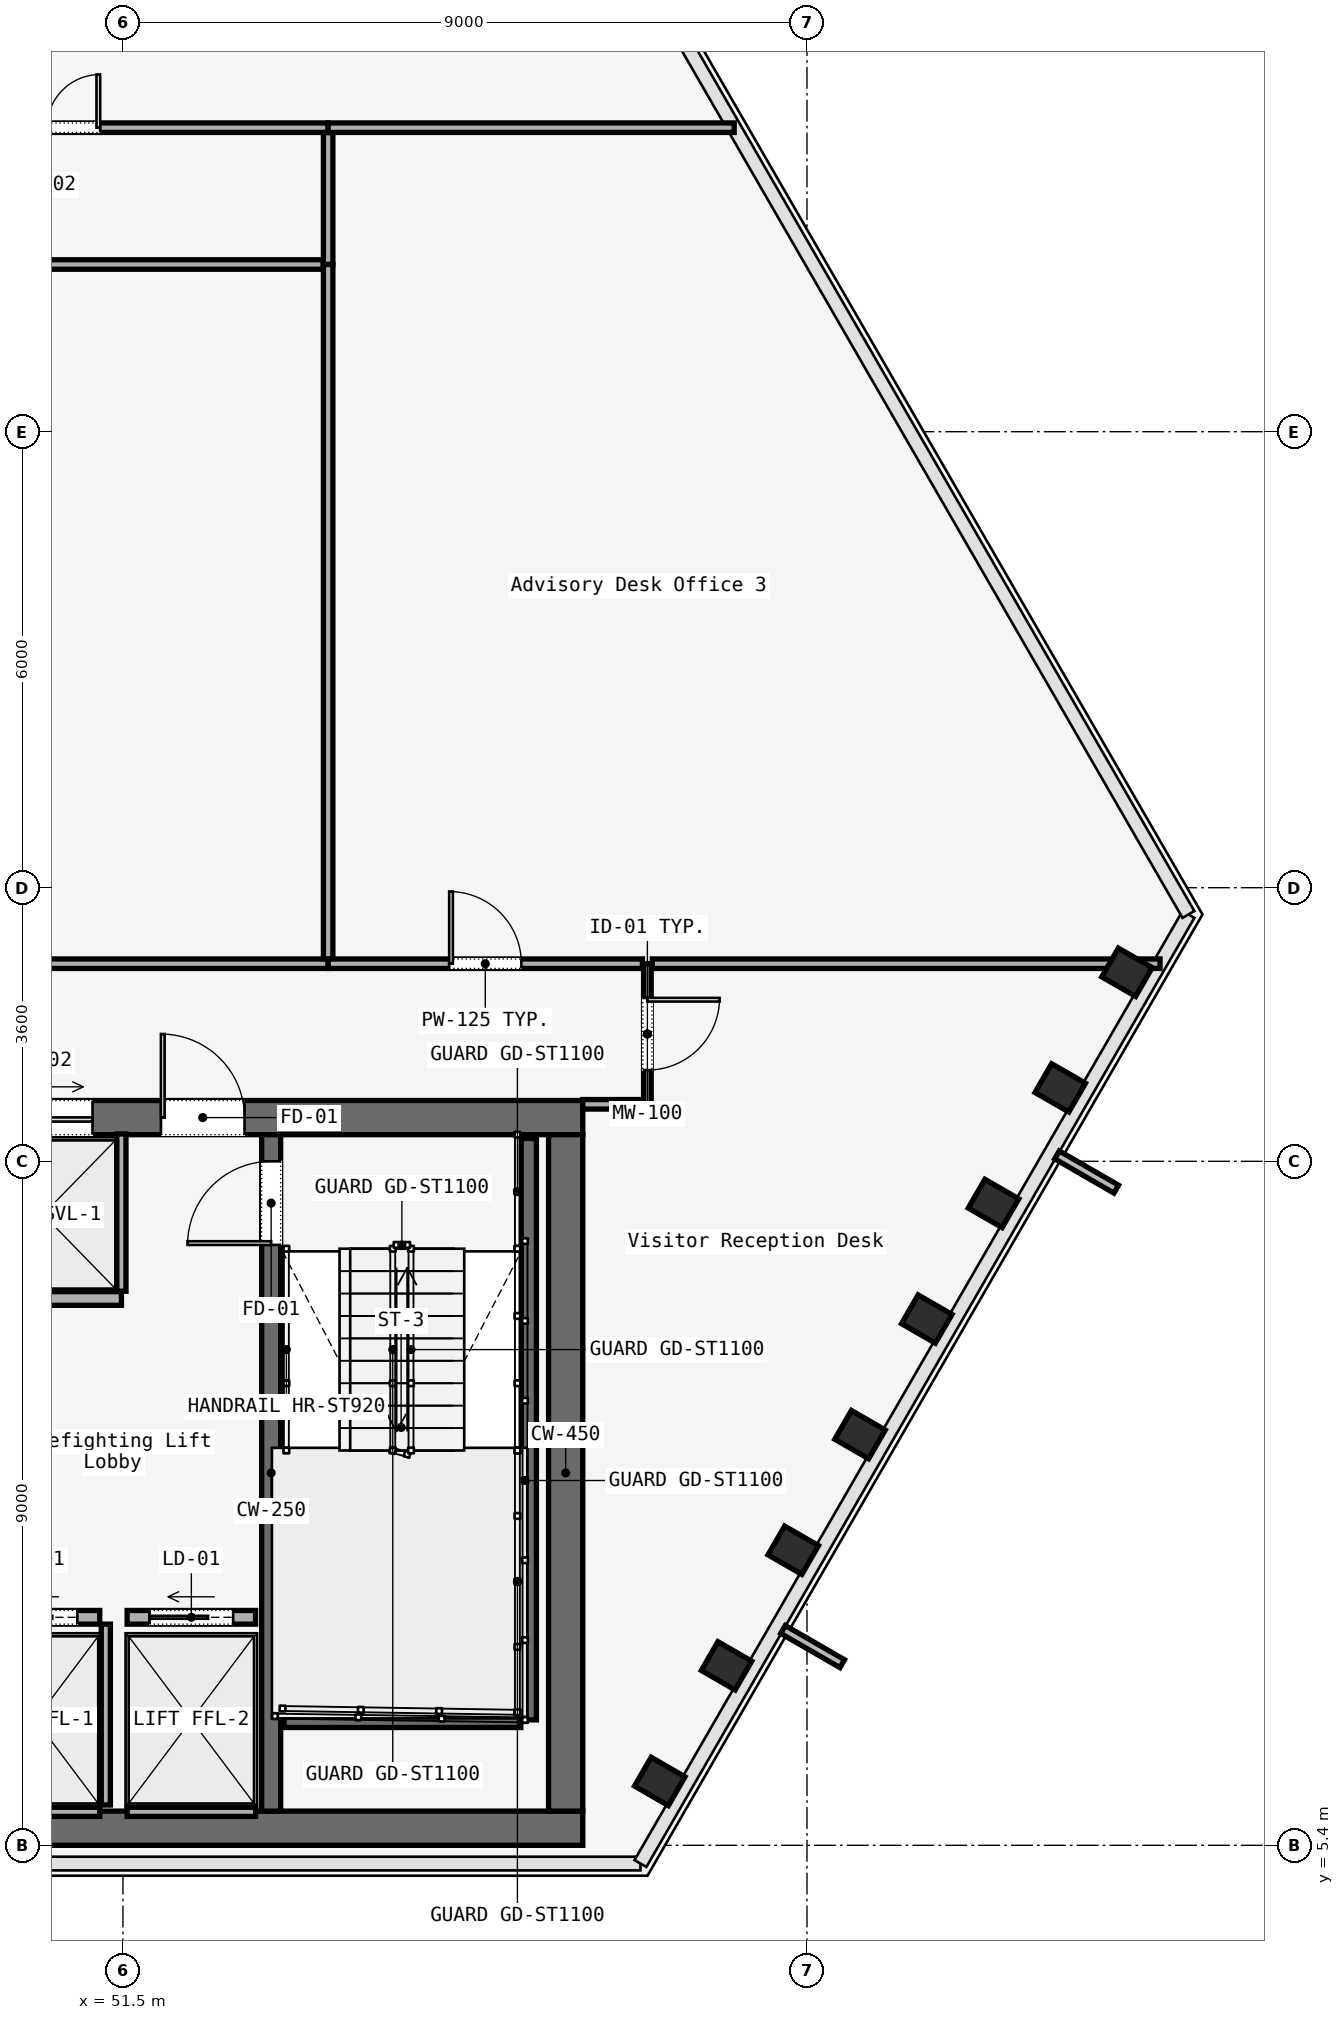
"""IFC4 building model, lengths in metres.
Left out: names, types, materials, properties, quantities, classifications, styles, units other than length and angle.
Written with IfcOpenShell. Run it as: python <this file> out.ifc"""

import sys

from ifc_helpers import new_model, si_unit, direction, frame, frame_2d, origin, origin_2d, place, context, subcontext, project, spatial, rectangle, i_section, extrude, element, fill, save


model = new_model("IFC4")
c1 = context("Model", 3, precision=1e-05, world=origin(), true_north=direction((0.0, 1.0)))
c2 = subcontext(c1, "Body", "Model", "MODEL_VIEW")
j1 = project(units=[si_unit("LENGTHUNIT", "METRE"), si_unit("PLANEANGLEUNIT", "RADIAN")], contexts=[c1])
p1 = place(None, origin())
s1 = spatial("IfcSite", under=j1, at=p1, CompositionType="ELEMENT")
p2 = place(p1, origin())
s2 = spatial("IfcBuilding", under=s1, at=p2, CompositionType="ELEMENT")
p3 = place(p2, frame((0.0, 0.0, 81.6)))
s3 = spatial("IfcBuildingStorey", under=s2, at=p3, CompositionType="ELEMENT", Elevation=81.6)
p4 = place(p3, frame((26.45, 14.975, 0.0), z_axis=(0.0, 0.0, 1.0), x_axis=(1.0, 0.0, 0.0)))
e1 = element("IfcWall", 1, at=p4, inside=s3, PredefinedType="SOLIDWALL", context=c2, shape_type="SweptSolid", body=[
    extrude(rectangle(XDim=31.1, YDim=0.45, at=frame_2d((15.55, 0.0))), origin(), (0.0, 0.0, 1.0), 3.58),
])
p5 = place(p4, frame((1.65, 0.0, 0.0)))
e2 = element("IfcOpeningElement", 2, at=p5, cuts=e1, PredefinedType="OPENING", context=c2, shape_type="SweptSolid", body=[
    extrude(rectangle(XDim=1.1, YDim=2.2, at=frame_2d((0.55, 1.1))), frame((0.0, 0.225, 0.0), z_axis=(0.0, -1.0, 0.0), x_axis=(1.0, 0.0, 0.0)), (0.0, 0.0, 1.0), 0.45),
])
p6 = place(p4, frame((13.65, 0.0, 0.0)))
e3 = element("IfcOpeningElement", 3, at=p6, cuts=e1, PredefinedType="OPENING", context=c2, shape_type="SweptSolid", body=[
    extrude(rectangle(XDim=1.1, YDim=2.2, at=frame_2d((0.55, 1.1))), frame((0.0, 0.225, 0.0), z_axis=(0.0, -1.0, 0.0), x_axis=(1.0, 0.0, 0.0)), (0.0, 0.0, 1.0), 0.45),
])
p7 = place(p4, frame((25.55, 0.0, 0.0)))
e4 = element("IfcOpeningElement", 4, at=p7, cuts=e1, PredefinedType="OPENING", context=c2, shape_type="SweptSolid", body=[
    extrude(rectangle(XDim=1.1, YDim=2.2, at=frame_2d((0.55, 1.1))), frame((0.0, 0.225, 0.0), z_axis=(0.0, -1.0, 0.0), x_axis=(1.0, 0.0, 0.0)), (0.0, 0.0, 1.0), 0.45),
])
p8 = place(p4, frame((10.7, 0.0, 0.0)))
e5 = element("IfcOpeningElement", 5, at=p8, cuts=e1, PredefinedType="OPENING", context=c2, shape_type="SweptSolid", body=[
    extrude(rectangle(XDim=1.4, YDim=2.2, at=frame_2d((0.7, 1.1))), frame((0.0, 0.225, 0.0), z_axis=(0.0, -1.0, 0.0), x_axis=(1.0, 0.0, 0.0)), (0.0, 0.0, 1.0), 0.45),
])
p9 = place(p4, frame((19.35, 0.0, 0.0)))
e6 = element("IfcOpeningElement", 6, at=p9, cuts=e1, PredefinedType="OPENING", context=c2, shape_type="SweptSolid", body=[
    extrude(rectangle(XDim=1.1, YDim=2.2, at=frame_2d((0.55, 1.1))), frame((0.0, 0.225, 0.0), z_axis=(0.0, -1.0, 0.0), x_axis=(1.0, 0.0, 0.0)), (0.0, 0.0, 1.0), 0.45),
])
p10 = place(p4, frame((21.4, 0.0, 0.0)))
e7 = element("IfcOpeningElement", 7, at=p10, cuts=e1, PredefinedType="OPENING", context=c2, shape_type="SweptSolid", body=[
    extrude(rectangle(XDim=0.9, YDim=2.1, at=frame_2d((0.45, 1.05))), frame((0.0, 0.225, 0.0), z_axis=(0.0, -1.0, 0.0), x_axis=(1.0, 0.0, 0.0)), (0.0, 0.0, 1.0), 0.45),
])
p11 = place(p4, frame((23.35, 0.0, 0.0)))
e8 = element("IfcOpeningElement", 8, at=p11, cuts=e1, PredefinedType="OPENING", context=c2, shape_type="SweptSolid", body=[
    extrude(rectangle(XDim=1.3, YDim=2.3, at=frame_2d((0.65, 1.15))), frame((0.0, 0.225, 0.0), z_axis=(0.0, -1.0, 0.0), x_axis=(1.0, 0.0, 0.0)), (0.0, 0.0, 1.0), 0.45),
])
p12 = place(p3, frame((26.45, 5.625, 0.0), z_axis=(0.0, 0.0, 1.0), x_axis=(1.0, 0.0, 0.0)))
e9 = element("IfcWall", 9, at=p12, inside=s3, PredefinedType="SOLIDWALL", context=c2, shape_type="SweptSolid", body=[
    extrude(rectangle(XDim=31.1, YDim=0.45, at=frame_2d((15.55, 0.0))), origin(), (0.0, 0.0, 1.0), 3.58),
])
p13 = place(p3, frame((57.325, 5.85, 0.0), z_axis=(0.0, 0.0, 1.0), x_axis=(0.0, 1.0, 0.0)))
e10 = element("IfcWall", 10, at=p13, inside=s3, PredefinedType="SOLIDWALL", context=c2, shape_type="SweptSolid", body=[
    extrude(rectangle(XDim=8.9, YDim=0.45, at=frame_2d((4.45, 0.0))), origin(), (0.0, 0.0, 1.0), 3.58),
])
p14 = place(p3, frame((53.45, 5.85, 0.0), z_axis=(0.0, 0.0, 1.0), x_axis=(0.0, 1.0, 0.0)))
e11 = element("IfcWall", 11, at=p14, inside=s3, PredefinedType="SOLIDWALL", context=c2, shape_type="SweptSolid", body=[
    extrude(rectangle(XDim=8.9, YDim=0.25, at=frame_2d((4.45, 0.0))), origin(), (0.0, 0.0, 1.0), 3.58),
])
p15 = place(p14, frame((7.45, 0.0, 0.0)))
e12 = element("IfcOpeningElement", 12, at=p15, cuts=e11, PredefinedType="OPENING", context=c2, shape_type="SweptSolid", body=[
    extrude(rectangle(XDim=1.1, YDim=2.2, at=frame_2d((0.55, 1.1))), frame((0.0, 0.125, 0.0), z_axis=(0.0, -1.0, 0.0), x_axis=(1.0, 0.0, 0.0)), (0.0, 0.0, 1.0), 0.25),
])
for number, where, z_axis, x_axis in (
    (13, (58.563, 6.24, 0.0), (0.0, 0.0, 1.0), (0.5, 0.866, 0.0)),
    (14, (59.441, 7.761, 0.0), (0.0, 0.0, 1.0), (0.5, 0.866, 0.0)),
    (15, (60.32, 9.282, 0.0), (0.0, 0.0, 1.0), (0.5, 0.866, 0.0)),
    (16, (61.198, 10.803, 0.0), (0.0, 0.0, 1.0), (0.5, 0.866, 0.0)),
    (17, (62.076, 12.324, 0.0), (0.0, 0.0, 1.0), (0.5, 0.866, 0.0)),
    (18, (62.954, 13.845, 0.0), (0.0, 0.0, 1.0), (0.5, 0.866, 0.0)),
    (19, (63.832, 15.366, 0.0), (0.0, 0.0, 1.0), (0.5, 0.866, 0.0)),
    (20, (64.71, 16.887, 0.0), (0.0, 0.0, 1.0), (0.5, 0.866, 0.0)),
):
    element("IfcColumn", number, at=place(p3, frame(where, z_axis=z_axis, x_axis=x_axis)), inside=s3, PredefinedType="COLUMN", context=c2, shape_type="SweptSolid", body=[
        extrude(i_section(OverallWidth=0.437, OverallDepth=0.514, WebThickness=0.061, FlangeThickness=0.077, FilletRadius=0.015, at=origin_2d()), origin(), (0.0, 0.0, 1.0), 3.58),
    ])
p16 = place(p3, frame((56.84, 14.7, 0.0), z_axis=(0.0, 0.0, 1.0), x_axis=(0.0, -1.0, 0.0)))
e21 = element("IfcWall", 21, at=p16, inside=s3, PredefinedType="SOLIDWALL", context=c2, shape_type="SweptSolid", body=[
    extrude(rectangle(XDim=7.65, YDim=0.2, at=frame_2d((3.825, 0.0))), origin(), (0.0, 0.0, 1.0), 3.8),
])
p17 = place(p3, frame((53.62, 7.05, 0.0), z_axis=(0.0, 0.0, 1.0), x_axis=(1.0, 0.0, 0.0)))
e22 = element("IfcWall", 22, at=p17, inside=s3, PredefinedType="SOLIDWALL", context=c2, shape_type="SweptSolid", body=[
    extrude(rectangle(XDim=3.115, YDim=0.2, at=frame_2d((1.558, 0.0))), origin(), (0.0, 0.0, 1.0), 3.8),
])
p18 = place(p3, frame((49.505, 8.4, 0.0), z_axis=(0.0, 0.0, 1.0), x_axis=(1.0, 0.0, 0.0)))
e23 = element("IfcWall", 23, at=p18, inside=s3, PredefinedType="SOLIDWALL", context=c2, shape_type="SweptSolid", body=[
    extrude(rectangle(XDim=1.69, YDim=0.18, at=frame_2d((0.845, 0.0))), origin(), (0.0, 0.0, 1.0), 2.95),
])
p19 = place(p18, frame((0.295, 0.0, 0.0)))
e24 = element("IfcOpeningElement", 24, at=p19, cuts=e23, PredefinedType="OPENING", context=c2, shape_type="SweptSolid", body=[
    extrude(rectangle(XDim=1.1, YDim=2.2, at=frame_2d((0.55, 1.1))), frame((0.0, 0.09, 0.0), z_axis=(0.0, -1.0, 0.0), x_axis=(1.0, 0.0, 0.0)), (0.0, 0.0, 1.0), 0.18),
])
p20 = place(p3, frame((49.505, 5.84, 0.0), z_axis=(0.0, 0.0, 1.0), x_axis=(1.0, 0.0, 0.0)))
e25 = element("IfcWall", 25, at=p20, inside=s3, PredefinedType="SOLIDWALL", context=c2, shape_type="SweptSolid", body=[
    extrude(rectangle(XDim=1.69, YDim=0.12, at=frame_2d((0.845, 0.0))), origin(), (0.0, 0.0, 1.0), 2.95),
])
p21 = place(p3, frame((51.275, 5.93, 0.0), z_axis=(0.0, 0.0, 1.0), x_axis=(0.0, 1.0, 0.0)))
e26 = element("IfcWall", 26, at=p21, inside=s3, PredefinedType="SOLIDWALL", context=c2, shape_type="SweptSolid", body=[
    extrude(rectangle(XDim=2.38, YDim=0.12, at=frame_2d((1.19, 0.0))), origin(), (0.0, 0.0, 1.0), 2.95),
])
p22 = place(p3, frame((51.555, 8.4, 0.0), z_axis=(0.0, 0.0, 1.0), x_axis=(1.0, 0.0, 0.0)))
e27 = element("IfcWall", 27, at=p22, inside=s3, PredefinedType="SOLIDWALL", context=c2, shape_type="SweptSolid", body=[
    extrude(rectangle(XDim=1.69, YDim=0.18, at=frame_2d((0.845, 0.0))), origin(), (0.0, 0.0, 1.0), 2.95),
])
p23 = place(p22, frame((0.295, 0.0, 0.0)))
e28 = element("IfcOpeningElement", 28, at=p23, cuts=e27, PredefinedType="OPENING", context=c2, shape_type="SweptSolid", body=[
    extrude(rectangle(XDim=1.1, YDim=2.2, at=frame_2d((0.55, 1.1))), frame((0.0, 0.09, 0.0), z_axis=(0.0, -1.0, 0.0), x_axis=(1.0, 0.0, 0.0)), (0.0, 0.0, 1.0), 0.18),
])
p24 = place(p3, frame((51.555, 5.84, 0.0), z_axis=(0.0, 0.0, 1.0), x_axis=(1.0, 0.0, 0.0)))
e29 = element("IfcWall", 29, at=p24, inside=s3, PredefinedType="SOLIDWALL", context=c2, shape_type="SweptSolid", body=[
    extrude(rectangle(XDim=1.69, YDim=0.12, at=frame_2d((0.845, 0.0))), origin(), (0.0, 0.0, 1.0), 2.95),
])
p25 = place(p3, frame((49.44, 12.595, 0.0), z_axis=(0.0, 0.0, 1.0), x_axis=(1.0, 0.0, 0.0)))
e30 = element("IfcWall", 30, at=p25, inside=s3, PredefinedType="SOLIDWALL", context=c2, shape_type="SweptSolid", body=[
    extrude(rectangle(XDim=2.04, YDim=0.18, at=frame_2d((1.02, 0.0))), origin(), (0.0, 0.0, 1.0), 2.95),
])
p26 = place(p3, frame((51.48, 12.69, 0.0), z_axis=(0.0, 0.0, 1.0), x_axis=(0.0, 1.0, 0.0)))
e31 = element("IfcWall", 31, at=p26, inside=s3, PredefinedType="SOLIDWALL", context=c2, shape_type="SweptSolid", body=[
    extrude(rectangle(XDim=2.07, YDim=0.12, at=frame_2d((1.035, 0.0))), origin(), (0.0, 0.0, 1.0), 2.95),
])
p27 = place(p3, frame((58.4, 17.0, 0.0), z_axis=(0.0, 0.0, 1.0), x_axis=(0.0, -1.0, 0.0)))
e32 = element("IfcWall", 32, at=p27, inside=s3, PredefinedType="MOVABLE", context=c2, shape_type="SweptSolid", body=[
    extrude(rectangle(XDim=1.85, YDim=0.1, at=frame_2d((0.925, 0.0))), origin(), (0.0, 0.0, 1.0), 2.95),
])
p28 = place(p27, frame((0.45, 0.0, 0.0)))
e33 = element("IfcOpeningElement", 33, at=p28, cuts=e32, PredefinedType="OPENING", context=c2, shape_type="SweptSolid", body=[
    extrude(rectangle(XDim=0.95, YDim=2.2, at=frame_2d((0.475, 1.1))), frame((0.0, 0.05, 0.0), z_axis=(0.0, -1.0, 0.0), x_axis=(1.0, 0.0, 0.0)), (0.0, 0.0, 1.0), 0.1),
])
p29 = place(p3, frame((58.335, 15.15, 0.0), z_axis=(0.0, 0.0, 1.0), x_axis=(-1.0, 0.0, 0.0)))
e34 = element("IfcWall", 34, at=p29, inside=s3, PredefinedType="PARTITIONING", context=c2, shape_type="SweptSolid", body=[
    extrude(rectangle(XDim=0.785, YDim=0.125, at=frame_2d((0.393, 0.0))), origin(), (0.0, 0.0, 1.0), 2.95),
])
p30 = place(p3, frame((46.8, 28.0, 0.0), z_axis=(0.0, 0.0, 1.0), x_axis=(1.0, 0.0, 0.0)))
e35 = element("IfcWall", 35, at=p30, inside=s3, PredefinedType="PARTITIONING", context=c2, shape_type="SweptSolid", body=[
    extrude(rectangle(XDim=7.4, YDim=0.125, at=frame_2d((3.7, 0.0))), origin(), (0.0, 0.0, 1.0), 2.95),
])
p31 = place(p30, frame((3.0, 0.0, 0.0)))
e36 = element("IfcOpeningElement", 36, at=p31, cuts=e35, PredefinedType="OPENING", context=c2, shape_type="SweptSolid", body=[
    extrude(rectangle(XDim=1.4, YDim=2.2, at=frame_2d((0.7, 1.1))), frame((0.0, 0.062, 0.0), z_axis=(0.0, -1.0, 0.0), x_axis=(1.0, 0.0, 0.0)), (0.0, 0.0, 1.0), 0.125),
])
p32 = place(p3, frame((54.2, 27.935, 0.0), z_axis=(0.0, 0.0, 1.0), x_axis=(0.0, -1.0, 0.0)))
e37 = element("IfcWall", 37, at=p32, inside=s3, PredefinedType="PARTITIONING", context=c2, shape_type="SweptSolid", body=[
    extrude(rectangle(XDim=1.735, YDim=0.125, at=frame_2d((0.868, 0.0))), origin(), (0.0, 0.0, 1.0), 2.95),
])
p33 = place(p3, frame((54.135, 26.2, 0.0), z_axis=(0.0, 0.0, 1.0), x_axis=(-1.0, 0.0, 0.0)))
e38 = element("IfcWall", 38, at=p33, inside=s3, PredefinedType="PARTITIONING", context=c2, shape_type="SweptSolid", body=[
    extrude(rectangle(XDim=10.684, YDim=0.125, at=frame_2d((5.342, 0.0))), origin(), (0.0, 0.0, 1.0), 2.95),
])
p34 = place(p3, frame((43.451, 17.0, 0.0), z_axis=(0.0, 0.0, 1.0), x_axis=(1.0, 0.0, 0.0)))
e39 = element("IfcWall", 39, at=p34, inside=s3, PredefinedType="PARTITIONING", context=c2, shape_type="SweptSolid", body=[
    extrude(rectangle(XDim=10.749, YDim=0.125, at=frame_2d((5.374, 0.0))), origin(), (0.0, 0.0, 1.0), 2.95),
])
p35 = place(p34, frame((4.899, 0.0, 0.0)))
e40 = element("IfcOpeningElement", 40, at=p35, cuts=e39, PredefinedType="OPENING", context=c2, shape_type="SweptSolid", body=[
    extrude(rectangle(XDim=0.95, YDim=2.2, at=frame_2d((0.475, 1.1))), frame((0.0, 0.062, 0.0), z_axis=(0.0, -1.0, 0.0), x_axis=(1.0, 0.0, 0.0)), (0.0, 0.0, 1.0), 0.125),
])
p36 = place(p3, frame((54.2, 17.0, 0.0), z_axis=(0.0, 0.0, 1.0), x_axis=(1.0, 0.0, 0.0)))
e41 = element("IfcWall", 41, at=p36, inside=s3, PredefinedType="PARTITIONING", context=c2, shape_type="SweptSolid", body=[
    extrude(rectangle(XDim=4.135, YDim=0.125, at=frame_2d((2.067, 0.0))), origin(), (0.0, 0.0, 1.0), 2.95),
])
p37 = place(p36, frame((1.593, 0.0, 0.0)))
e42 = element("IfcOpeningElement", 42, at=p37, cuts=e41, PredefinedType="OPENING", context=c2, shape_type="SweptSolid", body=[
    extrude(rectangle(XDim=0.95, YDim=2.2, at=frame_2d((0.475, 1.1))), frame((0.0, 0.062, 0.0), z_axis=(0.0, -1.0, 0.0), x_axis=(1.0, 0.0, 0.0)), (0.0, 0.0, 1.0), 0.125),
])
p38 = place(p3, frame((58.465, 17.0, 0.0), z_axis=(0.0, 0.0, 1.0), x_axis=(1.0, 0.0, 0.0)))
e43 = element("IfcWall", 43, at=p38, inside=s3, PredefinedType="PARTITIONING", context=c2, shape_type="SweptSolid", body=[
    extrude(rectangle(XDim=6.68, YDim=0.125, at=frame_2d((3.34, 0.0))), origin(), (0.0, 0.0, 1.0), 2.95),
])
p39 = place(p3, frame((54.2, 26.2, 0.0), z_axis=(0.0, 0.0, 1.0), x_axis=(0.0, -1.0, 0.0)))
e44 = element("IfcWall", 44, at=p39, inside=s3, PredefinedType="PARTITIONING", context=c2, shape_type="SweptSolid", body=[
    extrude(rectangle(XDim=9.135, YDim=0.125, at=frame_2d((4.567, 0.0))), origin(), (0.0, 0.0, 1.0), 2.95),
])
p40 = place(p3, frame((54.2, 28.0, 0.0), z_axis=(0.0, 0.0, 1.0), x_axis=(1.0, 0.0, 0.0)))
e45 = element("IfcWall", 45, at=p40, inside=s3, PredefinedType="PARTITIONING", context=c2, shape_type="SweptSolid", body=[
    extrude(rectangle(XDim=5.342, YDim=0.125, at=frame_2d((2.671, 0.0))), origin(), (0.0, 0.0, 1.0), 2.95),
])
p41 = place(p7, origin())
e46 = element("IfcDoor", 46, at=p41, inside=s3, OperationType="SINGLE_SWING_RIGHT", PredefinedType="DOOR", context=c2, shape_type="SweptSolid", body=[
    extrude(rectangle(XDim=1.1, YDim=2.2, at=frame_2d((0.55, 1.1))), frame((0.0, 0.025, 0.0), z_axis=(0.0, -1.0, 0.0), x_axis=(1.0, 0.0, 0.0)), (0.0, 0.0, 1.0), 0.05),
])
fill(e4, e46)
p42 = place(p15, origin())
e47 = element("IfcDoor", 47, at=p42, inside=s3, OperationType="SINGLE_SWING_LEFT", PredefinedType="DOOR", context=c2, shape_type="SweptSolid", body=[
    extrude(rectangle(XDim=1.1, YDim=2.2, at=frame_2d((0.55, 1.1))), frame((0.0, 0.025, 0.0), z_axis=(0.0, -1.0, 0.0), x_axis=(1.0, 0.0, 0.0)), (0.0, 0.0, 1.0), 0.05),
])
fill(e12, e47)
p43 = place(p19, origin())
e48 = element("IfcDoor", 48, at=p43, inside=s3, OperationType="SLIDING_TO_LEFT", PredefinedType="DOOR", context=c2, shape_type="SweptSolid", body=[
    extrude(rectangle(XDim=1.1, YDim=2.2, at=frame_2d((0.55, 1.1))), frame((0.0, 0.025, 0.0), z_axis=(0.0, -1.0, 0.0), x_axis=(1.0, 0.0, 0.0)), (0.0, 0.0, 1.0), 0.05),
])
fill(e24, e48)
p44 = place(p23, origin())
e49 = element("IfcDoor", 49, at=p44, inside=s3, OperationType="SLIDING_TO_LEFT", PredefinedType="DOOR", context=c2, shape_type="SweptSolid", body=[
    extrude(rectangle(XDim=1.1, YDim=2.2, at=frame_2d((0.55, 1.1))), frame((0.0, 0.025, 0.0), z_axis=(0.0, -1.0, 0.0), x_axis=(1.0, 0.0, 0.0)), (0.0, 0.0, 1.0), 0.05),
])
fill(e28, e49)
p45 = place(p11, origin())
e50 = element("IfcDoor", 50, at=p45, inside=s3, OperationType="DOUBLE_DOOR_SLIDING", PredefinedType="DOOR", context=c2, shape_type="SweptSolid", body=[
    extrude(rectangle(XDim=1.3, YDim=2.3, at=frame_2d((0.65, 1.15))), frame((0.0, 0.025, 0.0), z_axis=(0.0, -1.0, 0.0), x_axis=(1.0, 0.0, 0.0)), (0.0, 0.0, 1.0), 0.05),
])
fill(e8, e50)
p46 = place(p28, origin())
e51 = element("IfcDoor", 51, at=p46, inside=s3, OperationType="SINGLE_SWING_RIGHT", PredefinedType="DOOR", context=c2, shape_type="SweptSolid", body=[
    extrude(rectangle(XDim=0.95, YDim=2.2, at=frame_2d((0.475, 1.1))), frame((0.0, 0.025, 0.0), z_axis=(0.0, -1.0, 0.0), x_axis=(1.0, 0.0, 0.0)), (0.0, 0.0, 1.0), 0.05),
])
fill(e33, e51)
p47 = place(p37, origin())
e52 = element("IfcDoor", 52, at=p47, inside=s3, OperationType="SINGLE_SWING_LEFT", PredefinedType="DOOR", context=c2, shape_type="SweptSolid", body=[
    extrude(rectangle(XDim=0.95, YDim=2.2, at=frame_2d((0.475, 1.1))), frame((0.0, 0.025, 0.0), z_axis=(0.0, -1.0, 0.0), x_axis=(1.0, 0.0, 0.0)), (0.0, 0.0, 1.0), 0.05),
])
fill(e42, e52)
p48 = place(p31, origin())
e53 = element("IfcDoor", 53, at=p48, inside=s3, OperationType="SINGLE_SWING_RIGHT", PredefinedType="DOOR", context=c2, shape_type="SweptSolid", body=[
    extrude(rectangle(XDim=1.4, YDim=2.2, at=frame_2d((0.7, 1.1))), frame((0.0, 0.025, 0.0), z_axis=(0.0, -1.0, 0.0), x_axis=(1.0, 0.0, 0.0)), (0.0, 0.0, 1.0), 0.05),
])
fill(e36, e53)
save(model, sys.argv[1])
